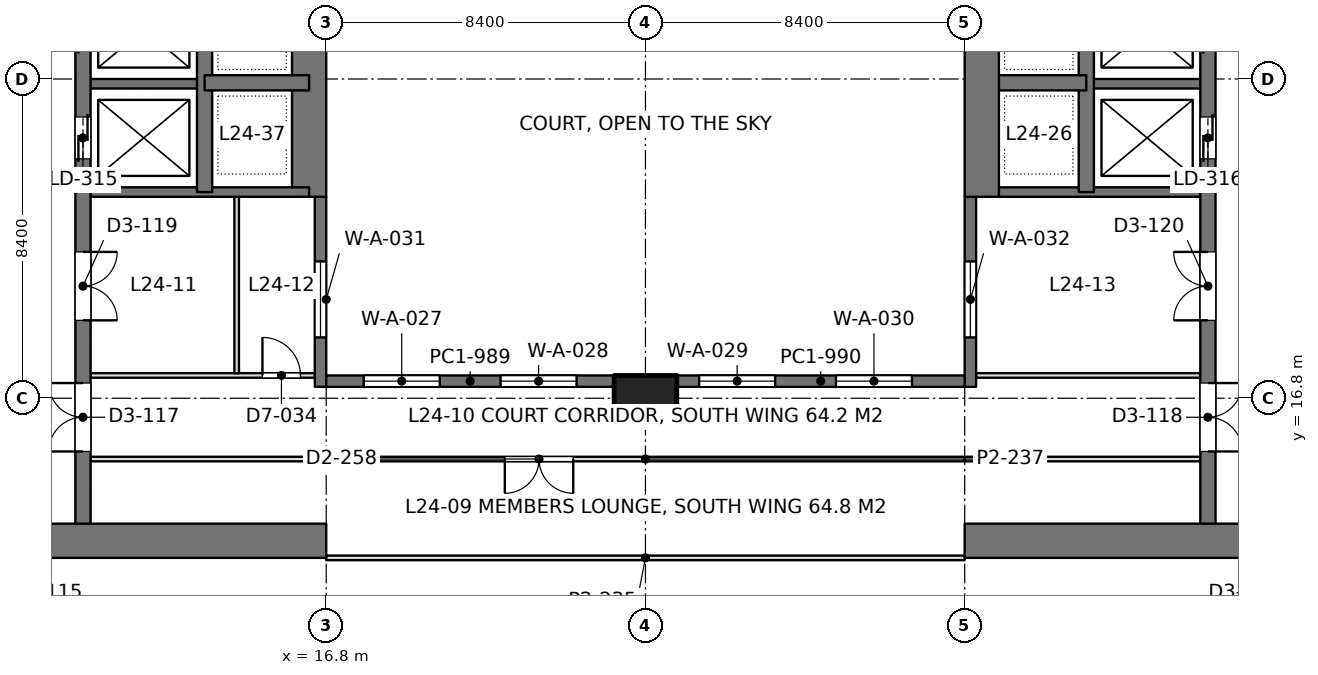
"""IFC4 building model, lengths in metres.
Left out: names, types, materials, properties, quantities, classifications, styles, units other than length and angle.
Written with IfcOpenShell. Run it as: python <this file> out.ifc"""

import sys

from ifc_helpers import new_model, si_unit, direction, frame, frame_2d, origin, origin_2d, place, context, subcontext, project, spatial, rectangle, extrude, element, fill, save


model = new_model("IFC4")
c1 = context("Model", 3, precision=1e-05, world=origin(), true_north=direction((0.0, 1.0)))
c2 = subcontext(c1, "Body", "Model", "MODEL_VIEW")
j1 = project(units=[si_unit("LENGTHUNIT", "METRE"), si_unit("PLANEANGLEUNIT", "RADIAN")], contexts=[c1])
p1 = place(None, origin())
s1 = spatial("IfcSite", under=j1, at=p1, CompositionType="ELEMENT")
p2 = place(p1, origin())
s2 = spatial("IfcBuilding", under=s1, at=p2, CompositionType="ELEMENT")
p3 = place(p2, frame((0.0, 0.0, 109.2)))
s3 = spatial("IfcBuildingStorey", under=s2, at=p3, CompositionType="ELEMENT", Elevation=109.2)
p4 = place(p3, frame((25.2, 16.8, 0.0), z_axis=(0.0, 0.0, 1.0), x_axis=(1.0, 0.0, 0.0)))
e1 = element("IfcColumn", 1, at=p4, inside=s3, PredefinedType="COLUMN", context=c2, shape_type="SweptSolid", body=[
    extrude(rectangle(XDim=1.65, YDim=1.2, at=origin_2d()), origin(), (0.0, 0.0, 1.0), 4.2),
])
p5 = place(p3, frame((-1.2, 13.05, 0.0), z_axis=(0.0, 0.0, 1.0), x_axis=(1.0, 0.0, 0.0)))
e2 = element("IfcWall", 2, at=p5, inside=s3, PredefinedType="SHEAR", context=c2, shape_type="SweptSolid", body=[
    extrude(rectangle(XDim=18.0, YDim=0.9, at=frame_2d((9.0, 0.0))), origin(), (0.0, 0.0, 1.0), 4.2),
])
p6 = place(p5, frame((8.95, 0.0, 0.0)))
e3 = element("IfcOpeningElement", 3, at=p6, cuts=e2, PredefinedType="OPENING", context=c2, shape_type="SweptSolid", body=[
    extrude(rectangle(XDim=1.8, YDim=2.4, at=frame_2d((0.9, 1.2))), frame((0.0, 0.46, 0.0), z_axis=(0.0, -1.0, 0.0), x_axis=(1.0, 0.0, 0.0)), (0.0, 0.0, 1.0), 0.92),
])
p7 = place(p3, frame((16.35, 22.1, 0.0), z_axis=(0.0, 0.0, 1.0), x_axis=(0.0, 1.0, 0.0)))
e4 = element("IfcWall", 4, at=p7, inside=s3, PredefinedType="SHEAR", context=c2, shape_type="SweptSolid", body=[
    extrude(rectangle(XDim=15.25, YDim=0.9, at=frame_2d((7.625, 0.0))), origin(), (0.0, 0.0, 1.0), 4.2),
])
p8 = place(p3, frame((10.4, 13.05, 0.0), z_axis=(0.0, 0.0, 1.0), x_axis=(0.0, 1.0, 0.0)))
e5 = element("IfcWall", 5, at=p8, inside=s3, PredefinedType="SHEAR", context=c2, shape_type="SweptSolid", body=[
    extrude(rectangle(XDim=24.3, YDim=0.4, at=frame_2d((12.15, 0.0))), origin(), (0.0, 0.0, 1.0), 4.2),
])
p9 = place(p8, frame((10.05, 0.0, 0.0)))
e6 = element("IfcOpeningElement", 6, at=p9, cuts=e5, PredefinedType="OPENING", context=c2, shape_type="SweptSolid", body=[
    extrude(rectangle(XDim=1.1, YDim=2.2, at=frame_2d((0.55, 1.1))), frame((0.0, 0.21, 0.0), z_axis=(0.0, -1.0, 0.0), x_axis=(1.0, 0.0, 0.0)), (0.0, 0.0, 1.0), 0.42),
])
p10 = place(p8, frame((12.9, 0.0, 0.0)))
e7 = element("IfcOpeningElement", 7, at=p10, cuts=e5, PredefinedType="OPENING", context=c2, shape_type="SweptSolid", body=[
    extrude(rectangle(XDim=1.1, YDim=2.2, at=frame_2d((0.55, 1.1))), frame((0.0, 0.21, 0.0), z_axis=(0.0, -1.0, 0.0), x_axis=(1.0, 0.0, 0.0)), (0.0, 0.0, 1.0), 0.42),
])
p11 = place(p8, frame((21.45, 0.0, 0.0)))
e8 = element("IfcOpeningElement", 8, at=p11, cuts=e5, PredefinedType="OPENING", context=c2, shape_type="SweptSolid", body=[
    extrude(rectangle(XDim=1.1, YDim=2.2, at=frame_2d((0.55, 1.1))), frame((0.0, 0.21, 0.0), z_axis=(0.0, -1.0, 0.0), x_axis=(1.0, 0.0, 0.0)), (0.0, 0.0, 1.0), 0.42),
])
p12 = place(p8, frame((2.35, 0.0, 0.0)))
e9 = element("IfcOpeningElement", 9, at=p12, cuts=e5, PredefinedType="OPENING", context=c2, shape_type="SweptSolid", body=[
    extrude(rectangle(XDim=1.8, YDim=2.4, at=frame_2d((0.9, 1.2))), frame((0.0, 0.21, 0.0), z_axis=(0.0, -1.0, 0.0), x_axis=(1.0, 0.0, 0.0)), (0.0, 0.0, 1.0), 0.42),
])
p13 = place(p8, frame((5.8, 0.0, 0.0)))
e10 = element("IfcOpeningElement", 10, at=p13, cuts=e5, PredefinedType="OPENING", context=c2, shape_type="SweptSolid", body=[
    extrude(rectangle(XDim=1.8, YDim=2.4, at=frame_2d((0.9, 1.2))), frame((0.0, 0.21, 0.0), z_axis=(0.0, -1.0, 0.0), x_axis=(1.0, 0.0, 0.0)), (0.0, 0.0, 1.0), 0.42),
])
p14 = place(p3, frame((13.6, 22.225, 0.0), z_axis=(0.0, 0.0, 1.0), x_axis=(0.0, 1.0, 0.0)))
e11 = element("IfcWall", 11, at=p14, inside=s3, PredefinedType="SHEAR", context=c2, shape_type="SweptSolid", body=[
    extrude(rectangle(XDim=15.125, YDim=0.4, at=frame_2d((7.562, 0.0))), origin(), (0.0, 0.0, 1.0), 4.2),
])
p15 = place(p3, frame((13.6, 25.1, 0.0), z_axis=(0.0, 0.0, 1.0), x_axis=(1.0, 0.0, 0.0)))
e12 = element("IfcWall", 12, at=p15, inside=s3, PredefinedType="SHEAR", context=c2, shape_type="SweptSolid", body=[
    extrude(rectangle(XDim=2.75, YDim=0.4, at=frame_2d((1.375, 0.0))), origin(), (0.0, 0.0, 1.0), 4.2),
])
p16 = place(p3, frame((10.4, 22.225, 0.0), z_axis=(0.0, 0.0, 1.0), x_axis=(1.0, 0.0, 0.0)))
e13 = element("IfcWall", 13, at=p16, inside=s3, PredefinedType="SHEAR", context=c2, shape_type="SweptSolid", body=[
    extrude(rectangle(XDim=5.95, YDim=0.25, at=frame_2d((2.975, 0.0))), origin(), (0.0, 0.0, 1.0), 4.2),
])
p17 = place(p3, frame((10.4, 25.075, 0.0), z_axis=(0.0, 0.0, 1.0), x_axis=(1.0, 0.0, 0.0)))
e14 = element("IfcWall", 14, at=p17, inside=s3, PredefinedType="SHEAR", context=c2, shape_type="SweptSolid", body=[
    extrude(rectangle(XDim=3.2, YDim=0.25, at=frame_2d((1.6, 0.0))), origin(), (0.0, 0.0, 1.0), 4.2),
])
p18 = place(p3, frame((33.6, 13.05, 0.0), z_axis=(0.0, 0.0, 1.0), x_axis=(1.0, 0.0, 0.0)))
e15 = element("IfcWall", 15, at=p18, inside=s3, PredefinedType="SHEAR", context=c2, shape_type="SweptSolid", body=[
    extrude(rectangle(XDim=18.0, YDim=0.9, at=frame_2d((9.0, 0.0))), origin(), (0.0, 0.0, 1.0), 4.2),
])
p19 = place(p18, frame((7.25, 0.0, 0.0)))
e16 = element("IfcOpeningElement", 16, at=p19, cuts=e15, PredefinedType="OPENING", context=c2, shape_type="SweptSolid", body=[
    extrude(rectangle(XDim=1.8, YDim=2.4, at=frame_2d((0.9, 1.2))), frame((0.0, 0.46, 0.0), z_axis=(0.0, -1.0, 0.0), x_axis=(1.0, 0.0, 0.0)), (0.0, 0.0, 1.0), 0.92),
])
p20 = place(p3, frame((34.05, 22.1, 0.0), z_axis=(0.0, 0.0, 1.0), x_axis=(0.0, 1.0, 0.0)))
e17 = element("IfcWall", 17, at=p20, inside=s3, PredefinedType="SHEAR", context=c2, shape_type="SweptSolid", body=[
    extrude(rectangle(XDim=15.25, YDim=0.9, at=frame_2d((7.625, 0.0))), origin(), (0.0, 0.0, 1.0), 4.2),
])
p21 = place(p3, frame((40.0, 13.05, 0.0), z_axis=(0.0, 0.0, 1.0), x_axis=(0.0, 1.0, 0.0)))
e18 = element("IfcWall", 18, at=p21, inside=s3, PredefinedType="SHEAR", context=c2, shape_type="SweptSolid", body=[
    extrude(rectangle(XDim=24.3, YDim=0.4, at=frame_2d((12.15, 0.0))), origin(), (0.0, 0.0, 1.0), 4.2),
])
p22 = place(p21, frame((10.05, 0.0, 0.0)))
e19 = element("IfcOpeningElement", 19, at=p22, cuts=e18, PredefinedType="OPENING", context=c2, shape_type="SweptSolid", body=[
    extrude(rectangle(XDim=1.1, YDim=2.2, at=frame_2d((0.55, 1.1))), frame((0.0, 0.21, 0.0), z_axis=(0.0, -1.0, 0.0), x_axis=(1.0, 0.0, 0.0)), (0.0, 0.0, 1.0), 0.42),
])
p23 = place(p21, frame((12.9, 0.0, 0.0)))
e20 = element("IfcOpeningElement", 20, at=p23, cuts=e18, PredefinedType="OPENING", context=c2, shape_type="SweptSolid", body=[
    extrude(rectangle(XDim=1.1, YDim=2.2, at=frame_2d((0.55, 1.1))), frame((0.0, 0.21, 0.0), z_axis=(0.0, -1.0, 0.0), x_axis=(1.0, 0.0, 0.0)), (0.0, 0.0, 1.0), 0.42),
])
p24 = place(p21, frame((21.45, 0.0, 0.0)))
e21 = element("IfcOpeningElement", 21, at=p24, cuts=e18, PredefinedType="OPENING", context=c2, shape_type="SweptSolid", body=[
    extrude(rectangle(XDim=1.1, YDim=2.2, at=frame_2d((0.55, 1.1))), frame((0.0, 0.21, 0.0), z_axis=(0.0, -1.0, 0.0), x_axis=(1.0, 0.0, 0.0)), (0.0, 0.0, 1.0), 0.42),
])
p25 = place(p21, frame((2.35, 0.0, 0.0)))
e22 = element("IfcOpeningElement", 22, at=p25, cuts=e18, PredefinedType="OPENING", context=c2, shape_type="SweptSolid", body=[
    extrude(rectangle(XDim=1.8, YDim=2.4, at=frame_2d((0.9, 1.2))), frame((0.0, 0.21, 0.0), z_axis=(0.0, -1.0, 0.0), x_axis=(1.0, 0.0, 0.0)), (0.0, 0.0, 1.0), 0.42),
])
p26 = place(p21, frame((5.8, 0.0, 0.0)))
e23 = element("IfcOpeningElement", 23, at=p26, cuts=e18, PredefinedType="OPENING", context=c2, shape_type="SweptSolid", body=[
    extrude(rectangle(XDim=1.8, YDim=2.4, at=frame_2d((0.9, 1.2))), frame((0.0, 0.21, 0.0), z_axis=(0.0, -1.0, 0.0), x_axis=(1.0, 0.0, 0.0)), (0.0, 0.0, 1.0), 0.42),
])
p27 = place(p3, frame((36.8, 22.225, 0.0), z_axis=(0.0, 0.0, 1.0), x_axis=(0.0, 1.0, 0.0)))
e24 = element("IfcWall", 24, at=p27, inside=s3, PredefinedType="SHEAR", context=c2, shape_type="SweptSolid", body=[
    extrude(rectangle(XDim=15.125, YDim=0.4, at=frame_2d((7.562, 0.0))), origin(), (0.0, 0.0, 1.0), 4.2),
])
p28 = place(p3, frame((36.8, 25.1, 0.0), z_axis=(0.0, 0.0, 1.0), x_axis=(-1.0, 0.0, 0.0)))
e25 = element("IfcWall", 25, at=p28, inside=s3, PredefinedType="SHEAR", context=c2, shape_type="SweptSolid", body=[
    extrude(rectangle(XDim=2.75, YDim=0.4, at=frame_2d((1.375, 0.0))), origin(), (0.0, 0.0, 1.0), 4.2),
])
p29 = place(p3, frame((40.0, 22.225, 0.0), z_axis=(0.0, 0.0, 1.0), x_axis=(-1.0, 0.0, 0.0)))
e26 = element("IfcWall", 26, at=p29, inside=s3, PredefinedType="SHEAR", context=c2, shape_type="SweptSolid", body=[
    extrude(rectangle(XDim=5.95, YDim=0.25, at=frame_2d((2.975, 0.0))), origin(), (0.0, 0.0, 1.0), 4.2),
])
p30 = place(p3, frame((40.0, 25.075, 0.0), z_axis=(0.0, 0.0, 1.0), x_axis=(-1.0, 0.0, 0.0)))
e27 = element("IfcWall", 27, at=p30, inside=s3, PredefinedType="SHEAR", context=c2, shape_type="SweptSolid", body=[
    extrude(rectangle(XDim=3.2, YDim=0.25, at=frame_2d((1.6, 0.0))), origin(), (0.0, 0.0, 1.0), 4.2),
])
p31 = place(p3, frame((16.65, 17.1, 0.0), z_axis=(0.0, 0.0, 1.0), x_axis=(0.0, 1.0, 0.0)))
e28 = element("IfcWall", 28, at=p31, inside=s3, PredefinedType="SOLIDWALL", context=c2, shape_type="SweptSolid", body=[
    extrude(rectangle(XDim=5.0, YDim=0.3, at=frame_2d((2.5, 0.0))), origin(), (0.0, 0.0, 1.0), 4.05),
])
p32 = place(p31, frame((1.3, 0.0, 0.1)))
e29 = element("IfcOpeningElement", 29, at=p32, cuts=e28, PredefinedType="OPENING", context=c2, shape_type="SweptSolid", body=[
    extrude(rectangle(XDim=2.0, YDim=3.0, at=frame_2d((1.0, 1.5))), frame((0.0, 0.16, 0.0), z_axis=(0.0, -1.0, 0.0), x_axis=(1.0, 0.0, 0.0)), (0.0, 0.0, 1.0), 0.32),
])
p33 = place(p3, frame((33.75, 17.1, 0.0), z_axis=(0.0, 0.0, 1.0), x_axis=(0.0, 1.0, 0.0)))
e30 = element("IfcWall", 30, at=p33, inside=s3, PredefinedType="SOLIDWALL", context=c2, shape_type="SweptSolid", body=[
    extrude(rectangle(XDim=5.0, YDim=0.3, at=frame_2d((2.5, 0.0))), origin(), (0.0, 0.0, 1.0), 4.05),
])
p34 = place(p33, frame((1.3, 0.0, 0.1)))
e31 = element("IfcOpeningElement", 31, at=p34, cuts=e30, PredefinedType="OPENING", context=c2, shape_type="SweptSolid", body=[
    extrude(rectangle(XDim=2.0, YDim=3.0, at=frame_2d((1.0, 1.5))), frame((0.0, 0.16, 0.0), z_axis=(0.0, -1.0, 0.0), x_axis=(1.0, 0.0, 0.0)), (0.0, 0.0, 1.0), 0.32),
])
p35 = place(p3, frame((16.8, 17.25, 0.0), z_axis=(0.0, 0.0, 1.0), x_axis=(1.0, 0.0, 0.0)))
e32 = element("IfcWall", 32, at=p35, inside=s3, PredefinedType="SOLIDWALL", context=c2, shape_type="SweptSolid", body=[
    extrude(rectangle(XDim=7.575, YDim=0.3, at=frame_2d((3.788, 0.0))), origin(), (0.0, 0.0, 1.0), 4.05),
])
p36 = place(p35, frame((0.988, 0.0, 0.1)))
e33 = element("IfcOpeningElement", 33, at=p36, cuts=e32, PredefinedType="OPENING", context=c2, shape_type="SweptSolid", body=[
    extrude(rectangle(XDim=2.0, YDim=3.0, at=frame_2d((1.0, 1.5))), frame((0.0, 0.16, 0.0), z_axis=(0.0, -1.0, 0.0), x_axis=(1.0, 0.0, 0.0)), (0.0, 0.0, 1.0), 0.32),
])
p37 = place(p35, frame((4.587, 0.0, 0.1)))
e34 = element("IfcOpeningElement", 34, at=p37, cuts=e32, PredefinedType="OPENING", context=c2, shape_type="SweptSolid", body=[
    extrude(rectangle(XDim=2.0, YDim=3.0, at=frame_2d((1.0, 1.5))), frame((0.0, 0.16, 0.0), z_axis=(0.0, -1.0, 0.0), x_axis=(1.0, 0.0, 0.0)), (0.0, 0.0, 1.0), 0.32),
])
p38 = place(p3, frame((26.025, 17.25, 0.0), z_axis=(0.0, 0.0, 1.0), x_axis=(1.0, 0.0, 0.0)))
e35 = element("IfcWall", 35, at=p38, inside=s3, PredefinedType="SOLIDWALL", context=c2, shape_type="SweptSolid", body=[
    extrude(rectangle(XDim=7.575, YDim=0.3, at=frame_2d((3.788, 0.0))), origin(), (0.0, 0.0, 1.0), 4.05),
])
p39 = place(p38, frame((0.587, 0.0, 0.1)))
e36 = element("IfcOpeningElement", 36, at=p39, cuts=e35, PredefinedType="OPENING", context=c2, shape_type="SweptSolid", body=[
    extrude(rectangle(XDim=2.0, YDim=3.0, at=frame_2d((1.0, 1.5))), frame((0.0, 0.16, 0.0), z_axis=(0.0, -1.0, 0.0), x_axis=(1.0, 0.0, 0.0)), (0.0, 0.0, 1.0), 0.32),
])
p40 = place(p38, frame((4.188, 0.0, 0.1)))
e37 = element("IfcOpeningElement", 37, at=p40, cuts=e35, PredefinedType="OPENING", context=c2, shape_type="SweptSolid", body=[
    extrude(rectangle(XDim=2.0, YDim=3.0, at=frame_2d((1.0, 1.5))), frame((0.0, 0.16, 0.0), z_axis=(0.0, -1.0, 0.0), x_axis=(1.0, 0.0, 0.0)), (0.0, 0.0, 1.0), 0.32),
])
p41 = place(p3, frame((10.598, 17.4, 0.0), z_axis=(0.0, 0.0, 1.0), x_axis=(1.0, 0.0, 0.0)))
e38 = element("IfcWall", 38, at=p41, inside=s3, PredefinedType="PARTITIONING", context=c2, shape_type="SweptSolid", body=[
    extrude(rectangle(XDim=5.904, YDim=0.12, at=frame_2d((2.952, 0.0))), origin(), (0.0, 0.0, 1.0), 3.55),
])
p42 = place(p41, frame((4.524, 0.0, 0.0)))
e39 = element("IfcOpeningElement", 39, at=p42, cuts=e38, PredefinedType="OPENING", context=c2, shape_type="SweptSolid", body=[
    extrude(rectangle(XDim=1.0, YDim=2.4, at=frame_2d((0.5, 1.2))), frame((0.0, 0.07, 0.0), z_axis=(0.0, -1.0, 0.0), x_axis=(1.0, 0.0, 0.0)), (0.0, 0.0, 1.0), 0.14),
])
p43 = place(p3, frame((14.444, 17.458, 0.0), z_axis=(0.0, 0.0, 1.0), x_axis=(0.0, 1.0, 0.0)))
e40 = element("IfcWall", 40, at=p43, inside=s3, PredefinedType="PARTITIONING", context=c2, shape_type="SweptSolid", body=[
    extrude(rectangle(XDim=4.644, YDim=0.12, at=frame_2d((2.322, 0.0))), origin(), (0.0, 0.0, 1.0), 3.6),
])
p44 = place(p3, frame((33.898, 17.4, 0.0), z_axis=(0.0, 0.0, 1.0), x_axis=(1.0, 0.0, 0.0)))
e41 = element("IfcWall", 41, at=p44, inside=s3, PredefinedType="PARTITIONING", context=c2, shape_type="SweptSolid", body=[
    extrude(rectangle(XDim=5.904, YDim=0.12, at=frame_2d((2.952, 0.0))), origin(), (0.0, 0.0, 1.0), 3.55),
])
for number, where, z_axis, x_axis in (
    (42, (10.598, 15.2, 0.0), (0.0, 0.0, 1.0), (1.0, 0.0, 0.0)),
    (43, (33.598, 15.2, 0.0), (0.0, 0.0, 1.0), (1.0, 0.0, 0.0)),
):
    element("IfcWall", number, at=place(p3, frame(where, z_axis=z_axis, x_axis=x_axis)), inside=s3, PredefinedType="PARTITIONING", context=c2, shape_type="SweptSolid", body=[
        extrude(rectangle(XDim=6.204, YDim=0.12, at=frame_2d((3.102, 0.0))), origin(), (0.0, 0.0, 1.0), 3.55),
    ])
p45 = place(p3, frame((16.798, 15.2, 0.0), z_axis=(0.0, 0.0, 1.0), x_axis=(1.0, 0.0, 0.0)))
e44 = element("IfcWall", 44, at=p45, inside=s3, PredefinedType="PARTITIONING", context=c2, shape_type="SweptSolid", body=[
    extrude(rectangle(XDim=16.804, YDim=0.12, at=frame_2d((8.402, 0.0))), origin(), (0.0, 0.0, 1.0), 3.55),
])
p46 = place(p45, frame((4.702, 0.0, 0.0)))
e45 = element("IfcOpeningElement", 45, at=p46, cuts=e44, PredefinedType="OPENING", context=c2, shape_type="SweptSolid", body=[
    extrude(rectangle(XDim=1.8, YDim=2.2, at=frame_2d((0.9, 1.1))), frame((0.0, 0.07, 0.0), z_axis=(0.0, -1.0, 0.0), x_axis=(1.0, 0.0, 0.0)), (0.0, 0.0, 1.0), 0.14),
])
p47 = place(p3, frame((16.8, 12.6, 0.0), z_axis=(0.0, 0.0, 1.0), x_axis=(1.0, 0.0, 0.0)))
e46 = element("IfcWall", 46, at=p47, inside=s3, PredefinedType="PARTITIONING", context=c2, shape_type="SweptSolid", body=[
    extrude(rectangle(XDim=16.8, YDim=0.12, at=frame_2d((8.4, 0.0))), origin(), (0.0, 0.0, 1.0), 3.55),
])
p48 = place(p32, origin())
e47 = element("IfcWindow", 47, at=p48, inside=s3, PartitioningType="SINGLE_PANEL", PredefinedType="WINDOW", context=c2, shape_type="SweptSolid", body=[
    extrude(rectangle(XDim=2.0, YDim=3.0, at=frame_2d((1.0, 1.5))), frame((0.0, 0.03, 0.0), z_axis=(0.0, -1.0, 0.0), x_axis=(1.0, 0.0, 0.0)), (0.0, 0.0, 1.0), 0.06),
])
fill(e29, e47)
p49 = place(p34, origin())
e48 = element("IfcWindow", 48, at=p49, inside=s3, PartitioningType="SINGLE_PANEL", PredefinedType="WINDOW", context=c2, shape_type="SweptSolid", body=[
    extrude(rectangle(XDim=2.0, YDim=3.0, at=frame_2d((1.0, 1.5))), frame((0.0, 0.03, 0.0), z_axis=(0.0, -1.0, 0.0), x_axis=(1.0, 0.0, 0.0)), (0.0, 0.0, 1.0), 0.06),
])
fill(e31, e48)
p50 = place(p36, origin())
e49 = element("IfcWindow", 49, at=p50, inside=s3, PartitioningType="SINGLE_PANEL", PredefinedType="WINDOW", context=c2, shape_type="SweptSolid", body=[
    extrude(rectangle(XDim=2.0, YDim=3.0, at=frame_2d((1.0, 1.5))), frame((0.0, 0.03, 0.0), z_axis=(0.0, -1.0, 0.0), x_axis=(1.0, 0.0, 0.0)), (0.0, 0.0, 1.0), 0.06),
])
fill(e33, e49)
p51 = place(p37, origin())
e50 = element("IfcWindow", 50, at=p51, inside=s3, PartitioningType="SINGLE_PANEL", PredefinedType="WINDOW", context=c2, shape_type="SweptSolid", body=[
    extrude(rectangle(XDim=2.0, YDim=3.0, at=frame_2d((1.0, 1.5))), frame((0.0, 0.03, 0.0), z_axis=(0.0, -1.0, 0.0), x_axis=(1.0, 0.0, 0.0)), (0.0, 0.0, 1.0), 0.06),
])
fill(e34, e50)
p52 = place(p39, origin())
e51 = element("IfcWindow", 51, at=p52, inside=s3, PartitioningType="SINGLE_PANEL", PredefinedType="WINDOW", context=c2, shape_type="SweptSolid", body=[
    extrude(rectangle(XDim=2.0, YDim=3.0, at=frame_2d((1.0, 1.5))), frame((0.0, 0.03, 0.0), z_axis=(0.0, -1.0, 0.0), x_axis=(1.0, 0.0, 0.0)), (0.0, 0.0, 1.0), 0.06),
])
fill(e36, e51)
p53 = place(p40, origin())
e52 = element("IfcWindow", 52, at=p53, inside=s3, PartitioningType="SINGLE_PANEL", PredefinedType="WINDOW", context=c2, shape_type="SweptSolid", body=[
    extrude(rectangle(XDim=2.0, YDim=3.0, at=frame_2d((1.0, 1.5))), frame((0.0, 0.03, 0.0), z_axis=(0.0, -1.0, 0.0), x_axis=(1.0, 0.0, 0.0)), (0.0, 0.0, 1.0), 0.06),
])
fill(e37, e52)
p54 = place(p9, origin())
e53 = element("IfcDoor", 53, at=p54, inside=s3, OperationType="DOUBLE_DOOR_SLIDING", PredefinedType="DOOR", context=c2, shape_type="SweptSolid", body=[
    extrude(rectangle(XDim=1.1, YDim=2.2, at=frame_2d((0.55, 1.1))), frame((0.0, 0.025, 0.0), z_axis=(0.0, -1.0, 0.0), x_axis=(1.0, 0.0, 0.0)), (0.0, 0.0, 1.0), 0.05),
])
fill(e6, e53)
p55 = place(p12, origin())
e54 = element("IfcDoor", 54, at=p55, inside=s3, OperationType="DOUBLE_DOOR_SINGLE_SWING", PredefinedType="DOOR", context=c2, shape_type="SweptSolid", body=[
    extrude(rectangle(XDim=1.8, YDim=2.4, at=frame_2d((0.9, 1.2))), frame((0.0, 0.025, 0.0), z_axis=(0.0, -1.0, 0.0), x_axis=(1.0, 0.0, 0.0)), (0.0, 0.0, 1.0), 0.05),
])
fill(e9, e54)
p56 = place(p13, frame((1.8, 0.0, 0.0), z_axis=(0.0, 0.0, 1.0), x_axis=(-1.0, 0.0, 0.0)))
e55 = element("IfcDoor", 55, at=p56, inside=s3, OperationType="DOUBLE_DOOR_SINGLE_SWING", PredefinedType="DOOR", context=c2, shape_type="SweptSolid", body=[
    extrude(rectangle(XDim=1.8, YDim=2.4, at=frame_2d((0.9, 1.2))), frame((0.0, 0.025, 0.0), z_axis=(0.0, -1.0, 0.0), x_axis=(1.0, 0.0, 0.0)), (0.0, 0.0, 1.0), 0.05),
])
fill(e10, e55)
p57 = place(p22, origin())
e56 = element("IfcDoor", 56, at=p57, inside=s3, OperationType="DOUBLE_DOOR_SLIDING", PredefinedType="DOOR", context=c2, shape_type="SweptSolid", body=[
    extrude(rectangle(XDim=1.1, YDim=2.2, at=frame_2d((0.55, 1.1))), frame((0.0, 0.025, 0.0), z_axis=(0.0, -1.0, 0.0), x_axis=(1.0, 0.0, 0.0)), (0.0, 0.0, 1.0), 0.05),
])
fill(e19, e56)
p58 = place(p25, frame((1.8, 0.0, 0.0), z_axis=(0.0, 0.0, 1.0), x_axis=(-1.0, 0.0, 0.0)))
e57 = element("IfcDoor", 57, at=p58, inside=s3, OperationType="DOUBLE_DOOR_SINGLE_SWING", PredefinedType="DOOR", context=c2, shape_type="SweptSolid", body=[
    extrude(rectangle(XDim=1.8, YDim=2.4, at=frame_2d((0.9, 1.2))), frame((0.0, 0.025, 0.0), z_axis=(0.0, -1.0, 0.0), x_axis=(1.0, 0.0, 0.0)), (0.0, 0.0, 1.0), 0.05),
])
fill(e22, e57)
p59 = place(p26, origin())
e58 = element("IfcDoor", 58, at=p59, inside=s3, OperationType="DOUBLE_DOOR_SINGLE_SWING", PredefinedType="DOOR", context=c2, shape_type="SweptSolid", body=[
    extrude(rectangle(XDim=1.8, YDim=2.4, at=frame_2d((0.9, 1.2))), frame((0.0, 0.025, 0.0), z_axis=(0.0, -1.0, 0.0), x_axis=(1.0, 0.0, 0.0)), (0.0, 0.0, 1.0), 0.05),
])
fill(e23, e58)
p60 = place(p42, origin())
e59 = element("IfcDoor", 59, at=p60, inside=s3, OperationType="SINGLE_SWING_LEFT", PredefinedType="DOOR", context=c2, shape_type="SweptSolid", body=[
    extrude(rectangle(XDim=1.0, YDim=2.4, at=frame_2d((0.5, 1.2))), frame((0.0, 0.025, 0.0), z_axis=(0.0, -1.0, 0.0), x_axis=(1.0, 0.0, 0.0)), (0.0, 0.0, 1.0), 0.05),
])
fill(e39, e59)
p61 = place(p46, frame((1.8, 0.0, 0.0), z_axis=(0.0, 0.0, 1.0), x_axis=(-1.0, 0.0, 0.0)))
e60 = element("IfcDoor", 60, at=p61, inside=s3, OperationType="DOUBLE_DOOR_SINGLE_SWING", PredefinedType="DOOR", context=c2, shape_type="SweptSolid", body=[
    extrude(rectangle(XDim=1.8, YDim=2.2, at=frame_2d((0.9, 1.1))), frame((0.0, 0.025, 0.0), z_axis=(0.0, -1.0, 0.0), x_axis=(1.0, 0.0, 0.0)), (0.0, 0.0, 1.0), 0.05),
])
fill(e45, e60)
save(model, sys.argv[1])
